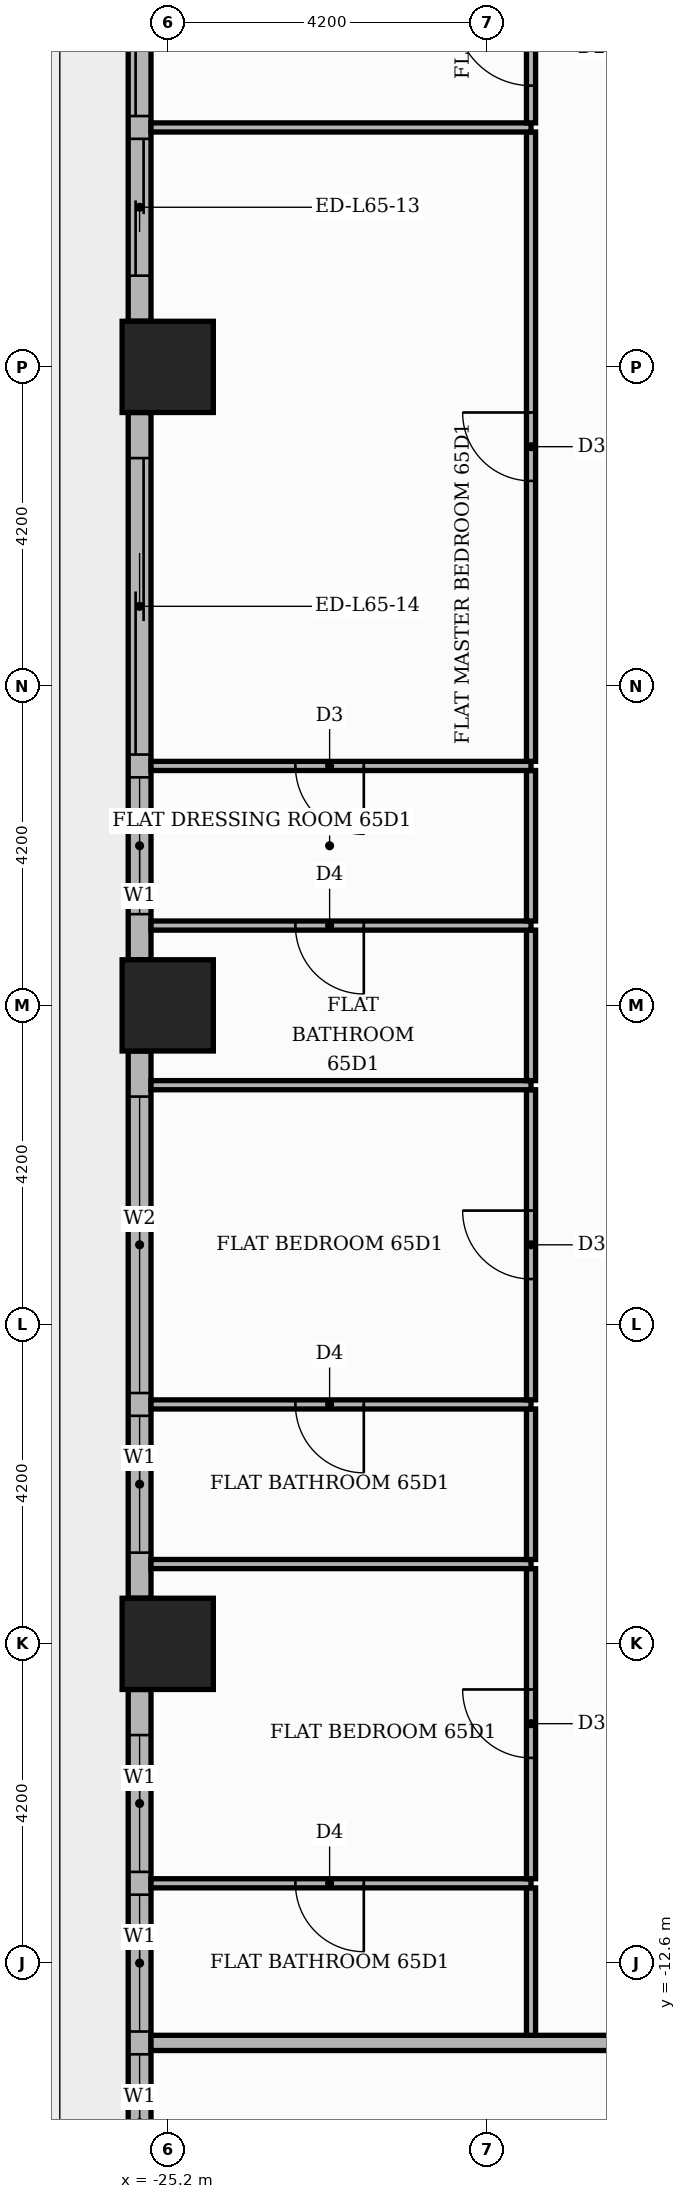
"""IFC4 building model, lengths in metres.
Left out: names, types, materials, properties, quantities, classifications, styles, units other than length and angle.
Written with IfcOpenShell. Run it as: python <this file> out.ifc"""

import sys

from ifc_helpers import new_model, si_unit, direction, frame, frame_2d, origin, origin_2d, place, context, subcontext, project, spatial, rectangle, extrude, element, fill, save


model = new_model("IFC4")
c1 = context("Model", 3, precision=1e-05, world=origin(), true_north=direction((0.0, 1.0)))
c2 = subcontext(c1, "Body", "Model", "MODEL_VIEW")
j1 = project(units=[si_unit("LENGTHUNIT", "METRE"), si_unit("PLANEANGLEUNIT", "RADIAN")], contexts=[c1])
p1 = place(None, origin())
s1 = spatial("IfcSite", under=j1, at=p1, CompositionType="ELEMENT")
p2 = place(p1, origin())
s2 = spatial("IfcBuilding", under=s1, at=p2, CompositionType="ELEMENT")
p3 = place(p2, frame((0.0, 0.0, 271.8)))
s3 = spatial("IfcBuildingStorey", under=s2, at=p3, CompositionType="ELEMENT", Elevation=271.8)
for number, where, z_axis, x_axis in (
    (1, (-25.2, 0.0, 0.0), (0.0, 0.0, 1.0), (1.0, 0.0, 0.0)),
    (2, (-25.2, -8.4, 0.0), (0.0, 0.0, 1.0), (1.0, 0.0, 0.0)),
    (3, (-25.2, 8.4, 0.0), (0.0, 0.0, 1.0), (1.0, 0.0, 0.0)),
):
    element("IfcColumn", number, at=place(p3, frame(where, z_axis=z_axis, x_axis=x_axis)), inside=s3, PredefinedType="COLUMN", context=c2, shape_type="SweptSolid", body=[
        extrude(rectangle(XDim=1.2, YDim=1.2, at=origin_2d()), origin(), (0.0, 0.0, 1.0), 3.9),
    ])
p4 = place(p3, frame((-25.57, 16.2, 0.0), z_axis=(0.0, 0.0, 1.0), x_axis=(0.0, -1.0, 0.0)))
e4 = element("IfcWall", 4, at=p4, inside=s3, PredefinedType="STANDARD", context=c2, shape_type="SweptSolid", body=[
    extrude(rectangle(XDim=7.2, YDim=0.3, at=frame_2d((3.6, 0.0))), origin(), (0.0, 0.0, 1.0), 3.48),
])
p5 = place(p4, frame((0.6, 0.0, 0.0)))
e5 = element("IfcOpeningElement", 5, at=p5, cuts=e4, PredefinedType="OPENING", context=c2, shape_type="SweptSolid", body=[
    extrude(rectangle(XDim=3.9, YDim=2.4, at=frame_2d((1.95, 1.2))), frame((0.0, 0.16, 0.0), z_axis=(0.0, -1.0, 0.0), x_axis=(1.0, 0.0, 0.0)), (0.0, 0.0, 1.0), 0.32),
])
p6 = place(p4, frame((4.8, 0.0, 0.0)))
e6 = element("IfcOpeningElement", 6, at=p6, cuts=e4, PredefinedType="OPENING", context=c2, shape_type="SweptSolid", body=[
    extrude(rectangle(XDim=1.8, YDim=2.4, at=frame_2d((0.9, 1.2))), frame((0.0, 0.16, 0.0), z_axis=(0.0, -1.0, 0.0), x_axis=(1.0, 0.0, 0.0)), (0.0, 0.0, 1.0), 0.32),
])
p7 = place(p3, frame((-25.57, 7.8, 0.0), z_axis=(0.0, 0.0, 1.0), x_axis=(0.0, -1.0, 0.0)))
e7 = element("IfcWall", 7, at=p7, inside=s3, PredefinedType="STANDARD", context=c2, shape_type="SweptSolid", body=[
    extrude(rectangle(XDim=7.2, YDim=0.3, at=frame_2d((3.6, 0.0))), origin(), (0.0, 0.0, 1.0), 3.48),
])
p8 = place(p7, frame((0.6, 0.0, 0.0)))
e8 = element("IfcOpeningElement", 8, at=p8, cuts=e7, PredefinedType="OPENING", context=c2, shape_type="SweptSolid", body=[
    extrude(rectangle(XDim=3.9, YDim=2.4, at=frame_2d((1.95, 1.2))), frame((0.0, 0.16, 0.0), z_axis=(0.0, -1.0, 0.0), x_axis=(1.0, 0.0, 0.0)), (0.0, 0.0, 1.0), 0.32),
])
p9 = place(p7, frame((4.8, 0.0, 0.9)))
e9 = element("IfcOpeningElement", 9, at=p9, cuts=e7, PredefinedType="OPENING", context=c2, shape_type="SweptSolid", body=[
    extrude(rectangle(XDim=1.8, YDim=2.1, at=frame_2d((0.9, 1.05))), frame((0.0, 0.16, 0.0), z_axis=(0.0, -1.0, 0.0), x_axis=(1.0, 0.0, 0.0)), (0.0, 0.0, 1.0), 0.32),
])
p10 = place(p3, frame((-25.57, -0.6, 0.0), z_axis=(0.0, 0.0, 1.0), x_axis=(0.0, -1.0, 0.0)))
e10 = element("IfcWall", 10, at=p10, inside=s3, PredefinedType="STANDARD", context=c2, shape_type="SweptSolid", body=[
    extrude(rectangle(XDim=7.2, YDim=0.3, at=frame_2d((3.6, 0.0))), origin(), (0.0, 0.0, 1.0), 3.48),
])
p11 = place(p10, frame((0.6, 0.0, 0.9)))
e11 = element("IfcOpeningElement", 11, at=p11, cuts=e10, PredefinedType="OPENING", context=c2, shape_type="SweptSolid", body=[
    extrude(rectangle(XDim=3.9, YDim=2.1, at=frame_2d((1.95, 1.05))), frame((0.0, 0.16, 0.0), z_axis=(0.0, -1.0, 0.0), x_axis=(1.0, 0.0, 0.0)), (0.0, 0.0, 1.0), 0.32),
])
p12 = place(p10, frame((4.8, 0.0, 0.9)))
e12 = element("IfcOpeningElement", 12, at=p12, cuts=e10, PredefinedType="OPENING", context=c2, shape_type="SweptSolid", body=[
    extrude(rectangle(XDim=1.8, YDim=2.1, at=frame_2d((0.9, 1.05))), frame((0.0, 0.16, 0.0), z_axis=(0.0, -1.0, 0.0), x_axis=(1.0, 0.0, 0.0)), (0.0, 0.0, 1.0), 0.32),
])
p13 = place(p3, frame((-25.57, -9.0, 0.0), z_axis=(0.0, 0.0, 1.0), x_axis=(0.0, -1.0, 0.0)))
e13 = element("IfcWall", 13, at=p13, inside=s3, PredefinedType="STANDARD", context=c2, shape_type="SweptSolid", body=[
    extrude(rectangle(XDim=7.2, YDim=0.3, at=frame_2d((3.6, 0.0))), origin(), (0.0, 0.0, 1.0), 3.48),
])
p14 = place(p13, frame((0.6, 0.0, 0.9)))
e14 = element("IfcOpeningElement", 14, at=p14, cuts=e13, PredefinedType="OPENING", context=c2, shape_type="SweptSolid", body=[
    extrude(rectangle(XDim=1.8, YDim=2.1, at=frame_2d((0.9, 1.05))), frame((0.0, 0.16, 0.0), z_axis=(0.0, -1.0, 0.0), x_axis=(1.0, 0.0, 0.0)), (0.0, 0.0, 1.0), 0.32),
])
p15 = place(p13, frame((2.7, 0.0, 0.9)))
e15 = element("IfcOpeningElement", 15, at=p15, cuts=e13, PredefinedType="OPENING", context=c2, shape_type="SweptSolid", body=[
    extrude(rectangle(XDim=1.8, YDim=2.1, at=frame_2d((0.9, 1.05))), frame((0.0, 0.16, 0.0), z_axis=(0.0, -1.0, 0.0), x_axis=(1.0, 0.0, 0.0)), (0.0, 0.0, 1.0), 0.32),
])
p16 = place(p13, frame((4.8, 0.0, 0.9)))
e16 = element("IfcOpeningElement", 16, at=p16, cuts=e13, PredefinedType="OPENING", context=c2, shape_type="SweptSolid", body=[
    extrude(rectangle(XDim=1.8, YDim=2.1, at=frame_2d((0.9, 1.05))), frame((0.0, 0.16, 0.0), z_axis=(0.0, -1.0, 0.0), x_axis=(1.0, 0.0, 0.0)), (0.0, 0.0, 1.0), 0.32),
])
p17 = place(p3, frame((-25.42, -13.65, 0.0), z_axis=(0.0, 0.0, 1.0), x_axis=(1.0, 0.0, 0.0)))
e17 = element("IfcWall", 17, at=p17, inside=s3, PredefinedType="PARTITIONING", context=c2, shape_type="SweptSolid", body=[
    extrude(rectangle(XDim=39.07, YDim=0.2, at=frame_2d((19.535, 0.0))), origin(), (0.0, 0.0, 1.0), 3.48),
])
p18 = place(p17, frame((14.37, 0.0, 0.0)))
e18 = element("IfcOpeningElement", 18, at=p18, cuts=e17, PredefinedType="OPENING", context=c2, shape_type="SweptSolid", body=[
    extrude(rectangle(XDim=1.1, YDim=2.4, at=frame_2d((0.55, 1.2))), frame((0.0, 0.11, 0.0), z_axis=(0.0, -1.0, 0.0), x_axis=(1.0, 0.0, 0.0)), (0.0, 0.0, 1.0), 0.22),
])
p19 = place(p3, frame((-20.42, -13.55, 0.0), z_axis=(0.0, 0.0, 1.0), x_axis=(0.0, 1.0, 0.0)))
e19 = element("IfcWall", 19, at=p19, inside=s3, PredefinedType="PARTITIONING", context=c2, shape_type="SweptSolid", body=[
    extrude(rectangle(XDim=1.94, YDim=0.12, at=frame_2d((0.97, 0.0))), origin(), (0.0, 0.0, 1.0), 3.48),
])
p20 = place(p3, frame((-25.42, -11.55, 0.0), z_axis=(0.0, 0.0, 1.0), x_axis=(1.0, 0.0, 0.0)))
e20 = element("IfcWall", 20, at=p20, inside=s3, PredefinedType="PARTITIONING", context=c2, shape_type="SweptSolid", body=[
    extrude(rectangle(XDim=5.0, YDim=0.12, at=frame_2d((2.5, 0.0))), origin(), (0.0, 0.0, 1.0), 3.48),
])
p21 = place(p20, frame((1.9, 0.0, 0.0)))
e21 = element("IfcOpeningElement", 21, at=p21, cuts=e20, PredefinedType="OPENING", context=c2, shape_type="SweptSolid", body=[
    extrude(rectangle(XDim=0.9, YDim=2.1, at=frame_2d((0.45, 1.05))), frame((0.0, 0.07, 0.0), z_axis=(0.0, -1.0, 0.0), x_axis=(1.0, 0.0, 0.0)), (0.0, 0.0, 1.0), 0.14),
])
p22 = place(p3, frame((-20.42, -11.49, 0.0), z_axis=(0.0, 0.0, 1.0), x_axis=(0.0, 1.0, 0.0)))
e22 = element("IfcWall", 22, at=p22, inside=s3, PredefinedType="PARTITIONING", context=c2, shape_type="SweptSolid", body=[
    extrude(rectangle(XDim=4.08, YDim=0.12, at=frame_2d((2.04, 0.0))), origin(), (0.0, 0.0, 1.0), 3.48),
])
p23 = place(p22, frame((1.59, 0.0, 0.0)))
e23 = element("IfcOpeningElement", 23, at=p23, cuts=e22, PredefinedType="OPENING", context=c2, shape_type="SweptSolid", body=[
    extrude(rectangle(XDim=0.9, YDim=2.1, at=frame_2d((0.45, 1.05))), frame((0.0, 0.07, 0.0), z_axis=(0.0, -1.0, 0.0), x_axis=(1.0, 0.0, 0.0)), (0.0, 0.0, 1.0), 0.14),
])
p24 = place(p3, frame((-25.42, -7.35, 0.0), z_axis=(0.0, 0.0, 1.0), x_axis=(1.0, 0.0, 0.0)))
e24 = element("IfcWall", 24, at=p24, inside=s3, PredefinedType="PARTITIONING", context=c2, shape_type="SweptSolid", body=[
    extrude(rectangle(XDim=5.0, YDim=0.12, at=frame_2d((2.5, 0.0))), origin(), (0.0, 0.0, 1.0), 3.48),
])
p25 = place(p3, frame((-20.42, -7.29, 0.0), z_axis=(0.0, 0.0, 1.0), x_axis=(0.0, 1.0, 0.0)))
e25 = element("IfcWall", 25, at=p25, inside=s3, PredefinedType="PARTITIONING", context=c2, shape_type="SweptSolid", body=[
    extrude(rectangle(XDim=1.98, YDim=0.12, at=frame_2d((0.99, 0.0))), origin(), (0.0, 0.0, 1.0), 3.48),
])
p26 = place(p3, frame((-25.42, -5.25, 0.0), z_axis=(0.0, 0.0, 1.0), x_axis=(1.0, 0.0, 0.0)))
e26 = element("IfcWall", 26, at=p26, inside=s3, PredefinedType="PARTITIONING", context=c2, shape_type="SweptSolid", body=[
    extrude(rectangle(XDim=5.0, YDim=0.12, at=frame_2d((2.5, 0.0))), origin(), (0.0, 0.0, 1.0), 3.48),
])
p27 = place(p26, frame((1.9, 0.0, 0.0)))
e27 = element("IfcOpeningElement", 27, at=p27, cuts=e26, PredefinedType="OPENING", context=c2, shape_type="SweptSolid", body=[
    extrude(rectangle(XDim=0.9, YDim=2.1, at=frame_2d((0.45, 1.05))), frame((0.0, 0.07, 0.0), z_axis=(0.0, -1.0, 0.0), x_axis=(1.0, 0.0, 0.0)), (0.0, 0.0, 1.0), 0.14),
])
p28 = place(p3, frame((-20.42, -5.19, 0.0), z_axis=(0.0, 0.0, 1.0), x_axis=(0.0, 1.0, 0.0)))
e28 = element("IfcWall", 28, at=p28, inside=s3, PredefinedType="PARTITIONING", context=c2, shape_type="SweptSolid", body=[
    extrude(rectangle(XDim=4.08, YDim=0.12, at=frame_2d((2.04, 0.0))), origin(), (0.0, 0.0, 1.0), 3.48),
])
p29 = place(p28, frame((1.59, 0.0, 0.0)))
e29 = element("IfcOpeningElement", 29, at=p29, cuts=e28, PredefinedType="OPENING", context=c2, shape_type="SweptSolid", body=[
    extrude(rectangle(XDim=0.9, YDim=2.1, at=frame_2d((0.45, 1.05))), frame((0.0, 0.07, 0.0), z_axis=(0.0, -1.0, 0.0), x_axis=(1.0, 0.0, 0.0)), (0.0, 0.0, 1.0), 0.14),
])
p30 = place(p3, frame((-25.42, -1.05, 0.0), z_axis=(0.0, 0.0, 1.0), x_axis=(1.0, 0.0, 0.0)))
e30 = element("IfcWall", 30, at=p30, inside=s3, PredefinedType="PARTITIONING", context=c2, shape_type="SweptSolid", body=[
    extrude(rectangle(XDim=5.0, YDim=0.12, at=frame_2d((2.5, 0.0))), origin(), (0.0, 0.0, 1.0), 3.48),
])
p31 = place(p3, frame((-20.42, -0.99, 0.0), z_axis=(0.0, 0.0, 1.0), x_axis=(0.0, 1.0, 0.0)))
e31 = element("IfcWall", 31, at=p31, inside=s3, PredefinedType="PARTITIONING", context=c2, shape_type="SweptSolid", body=[
    extrude(rectangle(XDim=1.98, YDim=0.12, at=frame_2d((0.99, 0.0))), origin(), (0.0, 0.0, 1.0), 3.48),
])
p32 = place(p3, frame((-25.42, 1.05, 0.0), z_axis=(0.0, 0.0, 1.0), x_axis=(1.0, 0.0, 0.0)))
e32 = element("IfcWall", 32, at=p32, inside=s3, PredefinedType="PARTITIONING", context=c2, shape_type="SweptSolid", body=[
    extrude(rectangle(XDim=5.0, YDim=0.12, at=frame_2d((2.5, 0.0))), origin(), (0.0, 0.0, 1.0), 3.48),
])
p33 = place(p32, frame((1.9, 0.0, 0.0)))
e33 = element("IfcOpeningElement", 33, at=p33, cuts=e32, PredefinedType="OPENING", context=c2, shape_type="SweptSolid", body=[
    extrude(rectangle(XDim=0.9, YDim=2.1, at=frame_2d((0.45, 1.05))), frame((0.0, 0.07, 0.0), z_axis=(0.0, -1.0, 0.0), x_axis=(1.0, 0.0, 0.0)), (0.0, 0.0, 1.0), 0.14),
])
p34 = place(p3, frame((-20.42, 1.11, 0.0), z_axis=(0.0, 0.0, 1.0), x_axis=(0.0, 1.0, 0.0)))
e34 = element("IfcWall", 34, at=p34, inside=s3, PredefinedType="PARTITIONING", context=c2, shape_type="SweptSolid", body=[
    extrude(rectangle(XDim=1.98, YDim=0.12, at=frame_2d((0.99, 0.0))), origin(), (0.0, 0.0, 1.0), 3.48),
])
p35 = place(p3, frame((-25.42, 3.15, 0.0), z_axis=(0.0, 0.0, 1.0), x_axis=(1.0, 0.0, 0.0)))
e35 = element("IfcWall", 35, at=p35, inside=s3, PredefinedType="PARTITIONING", context=c2, shape_type="SweptSolid", body=[
    extrude(rectangle(XDim=5.0, YDim=0.12, at=frame_2d((2.5, 0.0))), origin(), (0.0, 0.0, 1.0), 3.48),
])
p36 = place(p35, frame((1.9, 0.0, 0.0)))
e36 = element("IfcOpeningElement", 36, at=p36, cuts=e35, PredefinedType="OPENING", context=c2, shape_type="SweptSolid", body=[
    extrude(rectangle(XDim=0.9, YDim=2.1, at=frame_2d((0.45, 1.05))), frame((0.0, 0.07, 0.0), z_axis=(0.0, -1.0, 0.0), x_axis=(1.0, 0.0, 0.0)), (0.0, 0.0, 1.0), 0.14),
])
p37 = place(p3, frame((-20.42, 3.21, 0.0), z_axis=(0.0, 0.0, 1.0), x_axis=(0.0, 1.0, 0.0)))
e37 = element("IfcWall", 37, at=p37, inside=s3, PredefinedType="PARTITIONING", context=c2, shape_type="SweptSolid", body=[
    extrude(rectangle(XDim=8.28, YDim=0.12, at=frame_2d((4.14, 0.0))), origin(), (0.0, 0.0, 1.0), 3.48),
])
p38 = place(p37, frame((3.69, 0.0, 0.0)))
e38 = element("IfcOpeningElement", 38, at=p38, cuts=e37, PredefinedType="OPENING", context=c2, shape_type="SweptSolid", body=[
    extrude(rectangle(XDim=0.9, YDim=2.1, at=frame_2d((0.45, 1.05))), frame((0.0, 0.07, 0.0), z_axis=(0.0, -1.0, 0.0), x_axis=(1.0, 0.0, 0.0)), (0.0, 0.0, 1.0), 0.14),
])
p39 = place(p3, frame((-25.42, 11.55, 0.0), z_axis=(0.0, 0.0, 1.0), x_axis=(1.0, 0.0, 0.0)))
e39 = element("IfcWall", 39, at=p39, inside=s3, PredefinedType="PARTITIONING", context=c2, shape_type="SweptSolid", body=[
    extrude(rectangle(XDim=5.0, YDim=0.12, at=frame_2d((2.5, 0.0))), origin(), (0.0, 0.0, 1.0), 3.48),
])
p40 = place(p3, frame((-20.42, 11.61, 0.0), z_axis=(0.0, 0.0, 1.0), x_axis=(0.0, 1.0, 0.0)))
e40 = element("IfcWall", 40, at=p40, inside=s3, PredefinedType="PARTITIONING", context=c2, shape_type="SweptSolid", body=[
    extrude(rectangle(XDim=1.98, YDim=0.12, at=frame_2d((0.99, 0.0))), origin(), (0.0, 0.0, 1.0), 3.48),
])
p41 = place(p40, frame((0.49, 0.0, 0.0)))
e41 = element("IfcOpeningElement", 41, at=p41, cuts=e40, PredefinedType="OPENING", context=c2, shape_type="SweptSolid", body=[
    extrude(rectangle(XDim=1.0, YDim=2.1, at=frame_2d((0.5, 1.05))), frame((0.0, 0.07, 0.0), z_axis=(0.0, -1.0, 0.0), x_axis=(1.0, 0.0, 0.0)), (0.0, 0.0, 1.0), 0.14),
])
p42 = place(p5, origin())
e42 = element("IfcDoor", 42, at=p42, inside=s3, OperationType="SLIDING_TO_LEFT", PredefinedType="DOOR", context=c2, shape_type="SweptSolid", body=[
    extrude(rectangle(XDim=3.9, YDim=2.4, at=frame_2d((1.95, 1.2))), frame((0.0, 0.025, 0.0), z_axis=(0.0, -1.0, 0.0), x_axis=(1.0, 0.0, 0.0)), (0.0, 0.0, 1.0), 0.05),
])
fill(e5, e42)
p43 = place(p6, origin())
e43 = element("IfcDoor", 43, at=p43, inside=s3, OperationType="SLIDING_TO_RIGHT", PredefinedType="DOOR", context=c2, shape_type="SweptSolid", body=[
    extrude(rectangle(XDim=1.8, YDim=2.4, at=frame_2d((0.9, 1.2))), frame((0.0, 0.025, 0.0), z_axis=(0.0, -1.0, 0.0), x_axis=(1.0, 0.0, 0.0)), (0.0, 0.0, 1.0), 0.05),
])
fill(e6, e43)
p44 = place(p8, origin())
e44 = element("IfcDoor", 44, at=p44, inside=s3, OperationType="SLIDING_TO_LEFT", PredefinedType="DOOR", context=c2, shape_type="SweptSolid", body=[
    extrude(rectangle(XDim=3.9, YDim=2.4, at=frame_2d((1.95, 1.2))), frame((0.0, 0.025, 0.0), z_axis=(0.0, -1.0, 0.0), x_axis=(1.0, 0.0, 0.0)), (0.0, 0.0, 1.0), 0.05),
])
fill(e8, e44)
p45 = place(p9, origin())
e45 = element("IfcWindow", 45, at=p45, inside=s3, PartitioningType="SINGLE_PANEL", PredefinedType="WINDOW", context=c2, shape_type="SweptSolid", body=[
    extrude(rectangle(XDim=1.8, YDim=2.1, at=frame_2d((0.9, 1.05))), frame((0.0, 0.03, 0.0), z_axis=(0.0, -1.0, 0.0), x_axis=(1.0, 0.0, 0.0)), (0.0, 0.0, 1.0), 0.06),
])
fill(e9, e45)
p46 = place(p11, origin())
e46 = element("IfcWindow", 46, at=p46, inside=s3, PartitioningType="SINGLE_PANEL", PredefinedType="WINDOW", context=c2, shape_type="SweptSolid", body=[
    extrude(rectangle(XDim=3.9, YDim=2.1, at=frame_2d((1.95, 1.05))), frame((0.0, 0.03, 0.0), z_axis=(0.0, -1.0, 0.0), x_axis=(1.0, 0.0, 0.0)), (0.0, 0.0, 1.0), 0.06),
])
fill(e11, e46)
p47 = place(p12, origin())
e47 = element("IfcWindow", 47, at=p47, inside=s3, PartitioningType="SINGLE_PANEL", PredefinedType="WINDOW", context=c2, shape_type="SweptSolid", body=[
    extrude(rectangle(XDim=1.8, YDim=2.1, at=frame_2d((0.9, 1.05))), frame((0.0, 0.03, 0.0), z_axis=(0.0, -1.0, 0.0), x_axis=(1.0, 0.0, 0.0)), (0.0, 0.0, 1.0), 0.06),
])
fill(e12, e47)
p48 = place(p14, origin())
e48 = element("IfcWindow", 48, at=p48, inside=s3, PartitioningType="SINGLE_PANEL", PredefinedType="WINDOW", context=c2, shape_type="SweptSolid", body=[
    extrude(rectangle(XDim=1.8, YDim=2.1, at=frame_2d((0.9, 1.05))), frame((0.0, 0.03, 0.0), z_axis=(0.0, -1.0, 0.0), x_axis=(1.0, 0.0, 0.0)), (0.0, 0.0, 1.0), 0.06),
])
fill(e14, e48)
p49 = place(p15, origin())
e49 = element("IfcWindow", 49, at=p49, inside=s3, PartitioningType="SINGLE_PANEL", PredefinedType="WINDOW", context=c2, shape_type="SweptSolid", body=[
    extrude(rectangle(XDim=1.8, YDim=2.1, at=frame_2d((0.9, 1.05))), frame((0.0, 0.03, 0.0), z_axis=(0.0, -1.0, 0.0), x_axis=(1.0, 0.0, 0.0)), (0.0, 0.0, 1.0), 0.06),
])
fill(e15, e49)
p50 = place(p16, origin())
e50 = element("IfcWindow", 50, at=p50, inside=s3, PartitioningType="SINGLE_PANEL", PredefinedType="WINDOW", context=c2, shape_type="SweptSolid", body=[
    extrude(rectangle(XDim=1.8, YDim=2.1, at=frame_2d((0.9, 1.05))), frame((0.0, 0.03, 0.0), z_axis=(0.0, -1.0, 0.0), x_axis=(1.0, 0.0, 0.0)), (0.0, 0.0, 1.0), 0.06),
])
fill(e16, e50)
p51 = place(p41, origin())
e51 = element("IfcDoor", 51, at=p51, inside=s3, OperationType="SINGLE_SWING_RIGHT", PredefinedType="DOOR", context=c2, shape_type="SweptSolid", body=[
    extrude(rectangle(XDim=1.0, YDim=2.1, at=frame_2d((0.5, 1.05))), frame((0.0, 0.025, 0.0), z_axis=(0.0, -1.0, 0.0), x_axis=(1.0, 0.0, 0.0)), (0.0, 0.0, 1.0), 0.05),
])
fill(e41, e51)
p52 = place(p38, origin())
e52 = element("IfcDoor", 52, at=p52, inside=s3, OperationType="SINGLE_SWING_RIGHT", PredefinedType="DOOR", context=c2, shape_type="SweptSolid", body=[
    extrude(rectangle(XDim=0.9, YDim=2.1, at=frame_2d((0.45, 1.05))), frame((0.0, 0.025, 0.0), z_axis=(0.0, -1.0, 0.0), x_axis=(1.0, 0.0, 0.0)), (0.0, 0.0, 1.0), 0.05),
])
fill(e38, e52)
p53 = place(p36, frame((0.9, 0.0, 0.0), z_axis=(0.0, 0.0, 1.0), x_axis=(-1.0, 0.0, 0.0)))
e53 = element("IfcDoor", 53, at=p53, inside=s3, OperationType="SINGLE_SWING_RIGHT", PredefinedType="DOOR", context=c2, shape_type="SweptSolid", body=[
    extrude(rectangle(XDim=0.9, YDim=2.1, at=frame_2d((0.45, 1.05))), frame((0.0, 0.025, 0.0), z_axis=(0.0, -1.0, 0.0), x_axis=(1.0, 0.0, 0.0)), (0.0, 0.0, 1.0), 0.05),
])
fill(e36, e53)
p54 = place(p33, frame((0.9, 0.0, 0.0), z_axis=(0.0, 0.0, 1.0), x_axis=(-1.0, 0.0, 0.0)))
e54 = element("IfcDoor", 54, at=p54, inside=s3, OperationType="SINGLE_SWING_RIGHT", PredefinedType="DOOR", context=c2, shape_type="SweptSolid", body=[
    extrude(rectangle(XDim=0.9, YDim=2.1, at=frame_2d((0.45, 1.05))), frame((0.0, 0.025, 0.0), z_axis=(0.0, -1.0, 0.0), x_axis=(1.0, 0.0, 0.0)), (0.0, 0.0, 1.0), 0.05),
])
fill(e33, e54)
p55 = place(p29, origin())
e55 = element("IfcDoor", 55, at=p55, inside=s3, OperationType="SINGLE_SWING_RIGHT", PredefinedType="DOOR", context=c2, shape_type="SweptSolid", body=[
    extrude(rectangle(XDim=0.9, YDim=2.1, at=frame_2d((0.45, 1.05))), frame((0.0, 0.025, 0.0), z_axis=(0.0, -1.0, 0.0), x_axis=(1.0, 0.0, 0.0)), (0.0, 0.0, 1.0), 0.05),
])
fill(e29, e55)
p56 = place(p27, frame((0.9, 0.0, 0.0), z_axis=(0.0, 0.0, 1.0), x_axis=(-1.0, 0.0, 0.0)))
e56 = element("IfcDoor", 56, at=p56, inside=s3, OperationType="SINGLE_SWING_RIGHT", PredefinedType="DOOR", context=c2, shape_type="SweptSolid", body=[
    extrude(rectangle(XDim=0.9, YDim=2.1, at=frame_2d((0.45, 1.05))), frame((0.0, 0.025, 0.0), z_axis=(0.0, -1.0, 0.0), x_axis=(1.0, 0.0, 0.0)), (0.0, 0.0, 1.0), 0.05),
])
fill(e27, e56)
p57 = place(p23, origin())
e57 = element("IfcDoor", 57, at=p57, inside=s3, OperationType="SINGLE_SWING_RIGHT", PredefinedType="DOOR", context=c2, shape_type="SweptSolid", body=[
    extrude(rectangle(XDim=0.9, YDim=2.1, at=frame_2d((0.45, 1.05))), frame((0.0, 0.025, 0.0), z_axis=(0.0, -1.0, 0.0), x_axis=(1.0, 0.0, 0.0)), (0.0, 0.0, 1.0), 0.05),
])
fill(e23, e57)
p58 = place(p21, frame((0.9, 0.0, 0.0), z_axis=(0.0, 0.0, 1.0), x_axis=(-1.0, 0.0, 0.0)))
e58 = element("IfcDoor", 58, at=p58, inside=s3, OperationType="SINGLE_SWING_RIGHT", PredefinedType="DOOR", context=c2, shape_type="SweptSolid", body=[
    extrude(rectangle(XDim=0.9, YDim=2.1, at=frame_2d((0.45, 1.05))), frame((0.0, 0.025, 0.0), z_axis=(0.0, -1.0, 0.0), x_axis=(1.0, 0.0, 0.0)), (0.0, 0.0, 1.0), 0.05),
])
fill(e21, e58)
save(model, sys.argv[1])
